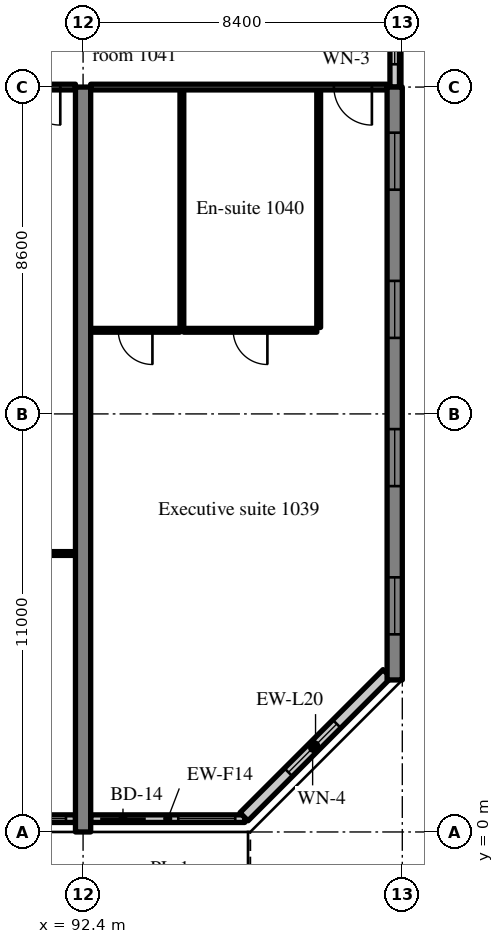
"""IFC4 building model, lengths in metres.
Left out: names, types, materials, properties, quantities, classifications, styles, units other than length and angle.
Written with IfcOpenShell. Run it as: python <this file> out.ifc"""

import sys

from ifc_helpers import new_model, si_unit, direction, frame, frame_2d, origin, place, context, subcontext, project, spatial, rectangle, extrude, source, transform, mapped, element, fill, save


model = new_model("IFC4")
c1 = context("Model", 3, precision=1e-05, world=origin(), true_north=direction((0.0, 1.0)))
c2 = subcontext(c1, "Body", "Model", "MODEL_VIEW")
j1 = project(units=[si_unit("LENGTHUNIT", "METRE"), si_unit("PLANEANGLEUNIT", "RADIAN")], contexts=[c1])
p1 = place(None, origin())
s1 = spatial("IfcSite", under=j1, at=p1, CompositionType="ELEMENT")
p2 = place(p1, origin())
s2 = spatial("IfcBuilding", under=s1, at=p2, CompositionType="ELEMENT")
p3 = place(p2, frame((0.0, 0.0, 46.8)))
s3 = spatial("IfcBuildingStorey", under=s2, at=p3, CompositionType="ELEMENT", Elevation=46.8)
m1 = source(origin(), c2, "Body", "SweptSolid", [
    extrude(rectangle(XDim=19.6, YDim=0.4, at=frame_2d((9.8, 0.0))), origin(), (0.0, 0.0, 1.0), 3.52),
])
p4 = place(p3, frame((92.4, 0.0, 0.0), z_axis=(0.0, 0.0, 1.0), x_axis=(0.0, 1.0, 0.0)))
e1 = element("IfcWall", 1, at=p4, inside=s3, PredefinedType="SHEAR", context=c2, shape_type="MappedRepresentation", body=[
    mapped(m1, transform((0.0, 0.0, 0.0), scale=1.0)),
])
m2 = source(origin(), c2, "Body", "SweptSolid", [
    extrude(rectangle(XDim=15.6, YDim=0.4, at=frame_2d((7.8, 0.0))), origin(), (0.0, 0.0, 1.0), 3.52),
])
p5 = place(p3, frame((100.6, 4.0, 0.0), z_axis=(0.0, 0.0, 1.0), x_axis=(0.0, 1.0, 0.0)))
e2 = element("IfcWall", 2, at=p5, inside=s3, PredefinedType="SHEAR", context=c2, shape_type="MappedRepresentation", body=[
    mapped(m2, transform((0.0, 0.0, 0.0), scale=1.0)),
])
m3 = source(origin(), c2, "Body", "SweptSolid", [
    extrude(rectangle(XDim=1.5, YDim=1.5, at=frame_2d((0.75, 0.75))), frame((0.0, 0.21, 0.0), z_axis=(0.0, -1.0, 0.0), x_axis=(1.0, 0.0, 0.0)), (0.0, 0.0, 1.0), 0.42),
])
p6 = place(p5, frame((1.2, 0.0, 0.9)))
e3 = element("IfcOpeningElement", 3, at=p6, cuts=e2, PredefinedType="OPENING", context=c2, shape_type="MappedRepresentation", body=[
    mapped(m3, transform((0.0, 0.0, 0.0), scale=1.0)),
])
p7 = place(p5, frame((5.1, 0.0, 0.9)))
e4 = element("IfcOpeningElement", 4, at=p7, cuts=e2, PredefinedType="OPENING", context=c2, shape_type="MappedRepresentation", body=[
    mapped(m3, transform((0.0, 0.0, 0.0), scale=1.0)),
])
p8 = place(p5, frame((9.0, 0.0, 0.9)))
e5 = element("IfcOpeningElement", 5, at=p8, cuts=e2, PredefinedType="OPENING", context=c2, shape_type="MappedRepresentation", body=[
    mapped(m3, transform((0.0, 0.0, 0.0), scale=1.0)),
])
p9 = place(p5, frame((12.9, 0.0, 0.9)))
e6 = element("IfcOpeningElement", 6, at=p9, cuts=e2, PredefinedType="OPENING", context=c2, shape_type="MappedRepresentation", body=[
    mapped(m3, transform((0.0, 0.0, 0.0), scale=1.0)),
])
m4 = source(origin(), c2, "Body", "SweptSolid", [
    extrude(rectangle(XDim=3.6, YDim=0.2, at=frame_2d((1.8, 0.0))), origin(), (0.0, 0.0, 1.0), 2.82),
])
p10 = place(p3, frame((88.6, 0.35, 0.0), z_axis=(0.0, 0.0, 1.0), x_axis=(1.0, 0.0, 0.0)))
e7 = element("IfcWall", 7, at=p10, inside=s3, PredefinedType="SOLIDWALL", context=c2, shape_type="MappedRepresentation", body=[
    mapped(m4, transform((0.0, 0.0, 0.0), scale=1.0)),
])
m5 = source(origin(), c2, "Body", "SweptSolid", [
    extrude(rectangle(XDim=1.2, YDim=2.4, at=frame_2d((0.6, 1.2))), frame((0.0, 0.11, 0.0), z_axis=(0.0, -1.0, 0.0), x_axis=(1.0, 0.0, 0.0)), (0.0, 0.0, 1.0), 0.22),
])
p11 = place(p10, frame((0.25, 0.0, 0.0)))
e8 = element("IfcOpeningElement", 8, at=p11, cuts=e7, PredefinedType="OPENING", context=c2, shape_type="MappedRepresentation", body=[
    mapped(m5, transform((0.0, 0.0, 0.0), scale=1.0)),
])
m6 = source(origin(), c2, "Body", "SweptSolid", [
    extrude(rectangle(XDim=1.5, YDim=1.5, at=frame_2d((0.75, 0.75))), frame((0.0, 0.11, 0.0), z_axis=(0.0, -1.0, 0.0), x_axis=(1.0, 0.0, 0.0)), (0.0, 0.0, 1.0), 0.22),
])
p12 = place(p10, frame((1.85, 0.0, 0.9)))
e9 = element("IfcOpeningElement", 9, at=p12, cuts=e7, PredefinedType="OPENING", context=c2, shape_type="MappedRepresentation", body=[
    mapped(m6, transform((0.0, 0.0, 0.0), scale=1.0)),
])
m7 = source(origin(), c2, "Body", "SweptSolid", [
    extrude(rectangle(XDim=4.055, YDim=0.2, at=frame_2d((2.027, 0.0))), origin(), (0.0, 0.0, 1.0), 2.82),
])
p13 = place(p3, frame((92.6, 0.35, 0.0), z_axis=(0.0, 0.0, 1.0), x_axis=(1.0, 0.0, 0.0)))
e10 = element("IfcWall", 10, at=p13, inside=s3, PredefinedType="SOLIDWALL", context=c2, shape_type="MappedRepresentation", body=[
    mapped(m7, transform((0.0, 0.0, 0.0), scale=1.0)),
])
p14 = place(p13, frame((0.25, 0.0, 0.0)))
e11 = element("IfcOpeningElement", 11, at=p14, cuts=e10, PredefinedType="OPENING", context=c2, shape_type="MappedRepresentation", body=[
    mapped(m5, transform((0.0, 0.0, 0.0), scale=1.0)),
])
p15 = place(p13, frame((2.305, 0.0, 0.9)))
e12 = element("IfcOpeningElement", 12, at=p15, cuts=e10, PredefinedType="OPENING", context=c2, shape_type="MappedRepresentation", body=[
    mapped(m6, transform((0.0, 0.0, 0.0), scale=1.0)),
])
m8 = source(origin(), c2, "Body", "SweptSolid", [
    extrude(rectangle(XDim=5.326, YDim=0.3, at=frame_2d((2.663, 0.0))), origin(), (0.0, 0.0, 1.0), 3.52),
])
p16 = place(p3, frame((96.634, 0.4, 0.0), z_axis=(0.0, 0.0, 1.0), x_axis=(0.707083859269, 0.707129702361, 0.0)))
e13 = element("IfcWall", 13, at=p16, inside=s3, PredefinedType="SOLIDWALL", context=c2, shape_type="MappedRepresentation", body=[
    mapped(m8, transform((0.0, 0.0, 0.0), scale=1.0)),
])
m9 = source(origin(), c2, "Body", "SweptSolid", [
    extrude(rectangle(XDim=1.8, YDim=1.5, at=frame_2d((0.9, 0.75))), frame((0.0, 0.16, 0.0), z_axis=(0.0, -1.0, 0.0), x_axis=(1.0, 0.0, 0.0)), (0.0, 0.0, 1.0), 0.32),
])
p17 = place(p16, frame((1.654, 0.0, 0.9)))
e14 = element("IfcOpeningElement", 14, at=p17, cuts=e13, PredefinedType="OPENING", context=c2, shape_type="MappedRepresentation", body=[
    mapped(m9, transform((0.0, 0.0, 0.0), scale=1.0)),
])
m10 = source(origin(), c2, "Body", "SweptSolid", [
    extrude(rectangle(XDim=2.4, YDim=0.25, at=frame_2d((1.2, 0.0))), origin(), (0.0, 0.0, 1.0), 2.62),
])
p18 = place(p3, frame((100.6, 19.6, 0.0), z_axis=(0.0, 0.0, 1.0), x_axis=(0.0, 1.0, 0.0)))
e15 = element("IfcWall", 15, at=p18, inside=s3, PredefinedType="SOLIDWALL", context=c2, shape_type="MappedRepresentation", body=[
    mapped(m10, transform((0.0, 0.0, 0.0), scale=1.0)),
])
m11 = source(origin(), c2, "Body", "SweptSolid", [
    extrude(rectangle(XDim=1.2, YDim=1.5, at=frame_2d((0.6, 0.75))), frame((0.0, 0.135, 0.0), z_axis=(0.0, -1.0, 0.0), x_axis=(1.0, 0.0, 0.0)), (0.0, 0.0, 1.0), 0.27),
])
p19 = place(p18, frame((0.6, 0.0, 0.9)))
e16 = element("IfcOpeningElement", 16, at=p19, cuts=e15, PredefinedType="OPENING", context=c2, shape_type="MappedRepresentation", body=[
    mapped(m11, transform((0.0, 0.0, 0.0), scale=1.0)),
])
m12 = source(origin(), c2, "Body", "SweptSolid", [
    extrude(rectangle(XDim=8.0, YDim=0.1, at=frame_2d((4.0, 0.0))), origin(), (0.0, 0.0, 1.0), 3.52),
])
p20 = place(p3, frame((84.2, 7.327, 0.0), z_axis=(0.0, 0.0, 1.0), x_axis=(1.0, 0.0, 0.0)))
e17 = element("IfcWall", 17, at=p20, inside=s3, PredefinedType="PARTITIONING", context=c2, shape_type="MappedRepresentation", body=[
    mapped(m12, transform((0.0, 0.0, 0.0), scale=1.0)),
])
m13 = source(origin(), c2, "Body", "SweptSolid", [
    extrude(rectangle(XDim=1.8, YDim=2.1, at=frame_2d((0.9, 1.05))), frame((0.0, 0.06, 0.0), z_axis=(0.0, -1.0, 0.0), x_axis=(1.0, 0.0, 0.0)), (0.0, 0.0, 1.0), 0.12),
])
p21 = place(p20, frame((3.1, 0.0, 0.0)))
e18 = element("IfcOpeningElement", 18, at=p21, cuts=e17, PredefinedType="OPENING", context=c2, shape_type="MappedRepresentation", body=[
    mapped(m13, transform((0.0, 0.0, 0.0), scale=1.0)),
])
m14 = source(origin(), c2, "Body", "SweptSolid", [
    extrude(rectangle(XDim=8.0, YDim=0.15, at=frame_2d((4.0, 0.0))), origin(), (0.0, 0.0, 1.0), 2.82),
])
p22 = place(p3, frame((84.2, 19.6, 0.0), z_axis=(0.0, 0.0, 1.0), x_axis=(1.0, 0.0, 0.0)))
e19 = element("IfcWall", 19, at=p22, inside=s3, PredefinedType="PARTITIONING", context=c2, shape_type="MappedRepresentation", body=[
    mapped(m14, transform((0.0, 0.0, 0.0), scale=1.0)),
])
m15 = source(origin(), c2, "Body", "SweptSolid", [
    extrude(rectangle(XDim=1.0, YDim=2.1, at=frame_2d((0.5, 1.05))), frame((0.0, 0.085, 0.0), z_axis=(0.0, -1.0, 0.0), x_axis=(1.0, 0.0, 0.0)), (0.0, 0.0, 1.0), 0.17),
])
p23 = place(p22, frame((6.6, 0.0, 0.0)))
e20 = element("IfcOpeningElement", 20, at=p23, cuts=e19, PredefinedType="OPENING", context=c2, shape_type="MappedRepresentation", body=[
    mapped(m15, transform((0.0, 0.0, 0.0), scale=1.0)),
])
m16 = source(origin(), c2, "Body", "SweptSolid", [
    extrude(rectangle(XDim=6.25, YDim=0.1, at=frame_2d((3.125, 0.0))), origin(), (0.0, 0.0, 1.0), 3.52),
])
for number, where, z_axis, x_axis in (
    (21, (98.6, 13.275, 0.0), (0.0, 0.0, 1.0), (0.0, 1.0, 0.0)),
    (22, (95.0, 13.275, 0.0), (0.0, 0.0, 1.0), (0.0, 1.0, 0.0)),
):
    element("IfcWall", number, at=place(p3, frame(where, z_axis=z_axis, x_axis=x_axis)), inside=s3, PredefinedType="PARTITIONING", context=c2, shape_type="MappedRepresentation", body=[
        mapped(m16, transform((0.0, 0.0, 0.0), scale=1.0)),
    ])
m17 = source(origin(), c2, "Body", "SweptSolid", [
    extrude(rectangle(XDim=3.5, YDim=0.1, at=frame_2d((1.75, 0.0))), origin(), (0.0, 0.0, 1.0), 3.52),
])
p24 = place(p3, frame((95.05, 13.2, 0.0), z_axis=(0.0, 0.0, 1.0), x_axis=(1.0, 0.0, 0.0)))
e23 = element("IfcWall", 23, at=p24, inside=s3, PredefinedType="PARTITIONING", context=c2, shape_type="MappedRepresentation", body=[
    mapped(m17, transform((0.0, 0.0, 0.0), scale=1.0)),
])
m18 = source(origin(), c2, "Body", "SweptSolid", [
    extrude(rectangle(XDim=0.9, YDim=2.1, at=frame_2d((0.45, 1.05))), frame((0.0, 0.06, 0.0), z_axis=(0.0, -1.0, 0.0), x_axis=(1.0, 0.0, 0.0)), (0.0, 0.0, 1.0), 0.12),
])
p25 = place(p24, frame((1.3, 0.0, 0.0)))
e24 = element("IfcOpeningElement", 24, at=p25, cuts=e23, PredefinedType="OPENING", context=c2, shape_type="MappedRepresentation", body=[
    mapped(m18, transform((0.0, 0.0, 0.0), scale=1.0)),
])
m19 = source(origin(), c2, "Body", "SweptSolid", [
    extrude(rectangle(XDim=2.35, YDim=0.1, at=frame_2d((1.175, 0.0))), origin(), (0.0, 0.0, 1.0), 3.52),
])
p26 = place(p3, frame((92.6, 13.2, 0.0), z_axis=(0.0, 0.0, 1.0), x_axis=(1.0, 0.0, 0.0)))
e25 = element("IfcWall", 25, at=p26, inside=s3, PredefinedType="PARTITIONING", context=c2, shape_type="MappedRepresentation", body=[
    mapped(m19, transform((0.0, 0.0, 0.0), scale=1.0)),
])
p27 = place(p26, frame((0.725, 0.0, 0.0)))
e26 = element("IfcOpeningElement", 26, at=p27, cuts=e25, PredefinedType="OPENING", context=c2, shape_type="MappedRepresentation", body=[
    mapped(m18, transform((0.0, 0.0, 0.0), scale=1.0)),
])
m20 = source(origin(), c2, "Body", "SweptSolid", [
    extrude(rectangle(XDim=7.8, YDim=0.15, at=frame_2d((3.9, 0.0))), origin(), (0.0, 0.0, 1.0), 2.82),
])
p28 = place(p3, frame((92.6, 19.6, 0.0), z_axis=(0.0, 0.0, 1.0), x_axis=(1.0, 0.0, 0.0)))
e27 = element("IfcWall", 27, at=p28, inside=s3, PredefinedType="PARTITIONING", context=c2, shape_type="MappedRepresentation", body=[
    mapped(m20, transform((0.0, 0.0, 0.0), scale=1.0)),
])
p29 = place(p28, frame((6.4, 0.0, 0.0)))
e28 = element("IfcOpeningElement", 28, at=p29, cuts=e27, PredefinedType="OPENING", context=c2, shape_type="MappedRepresentation", body=[
    mapped(m15, transform((0.0, 0.0, 0.0), scale=1.0)),
])
m21 = source(origin(), c2, "Body", "SweptSolid", [
    extrude(rectangle(XDim=1.5, YDim=1.5, at=frame_2d((0.75, 0.75))), frame((0.0, 0.03, 0.0), z_axis=(0.0, -1.0, 0.0), x_axis=(1.0, 0.0, 0.0)), (0.0, 0.0, 1.0), 0.06),
])
p30 = place(p12, origin())
e29 = element("IfcWindow", 29, at=p30, inside=s3, PartitioningType="SINGLE_PANEL", PredefinedType="WINDOW", context=c2, shape_type="MappedRepresentation", body=[
    mapped(m21, transform((0.0, 0.0, 0.0), scale=1.0)),
])
fill(e9, e29)
m22 = source(origin(), c2, "Body", "SweptSolid", [
    extrude(rectangle(XDim=1.2, YDim=2.4, at=frame_2d((0.6, 1.2))), frame((0.0, 0.025, 0.0), z_axis=(0.0, -1.0, 0.0), x_axis=(1.0, 0.0, 0.0)), (0.0, 0.0, 1.0), 0.05),
])
p31 = place(p14, origin())
e30 = element("IfcDoor", 30, at=p31, inside=s3, OperationType="SLIDING_TO_RIGHT", PredefinedType="DOOR", context=c2, shape_type="MappedRepresentation", body=[
    mapped(m22, transform((0.0, 0.0, 0.0), scale=1.0)),
])
fill(e11, e30)
p32 = place(p15, origin())
e31 = element("IfcWindow", 31, at=p32, inside=s3, PartitioningType="SINGLE_PANEL", PredefinedType="WINDOW", context=c2, shape_type="MappedRepresentation", body=[
    mapped(m21, transform((0.0, 0.0, 0.0), scale=1.0)),
])
fill(e12, e31)
m23 = source(origin(), c2, "Body", "SweptSolid", [
    extrude(rectangle(XDim=1.8, YDim=1.5, at=frame_2d((0.9, 0.75))), frame((0.0, 0.03, 0.0), z_axis=(0.0, -1.0, 0.0), x_axis=(1.0, 0.0, 0.0)), (0.0, 0.0, 1.0), 0.06),
])
p33 = place(p17, origin())
e32 = element("IfcWindow", 32, at=p33, inside=s3, PartitioningType="SINGLE_PANEL", PredefinedType="WINDOW", context=c2, shape_type="MappedRepresentation", body=[
    mapped(m23, transform((0.0, 0.0, 0.0), scale=1.0)),
])
fill(e14, e32)
p34 = place(p6, origin())
e33 = element("IfcWindow", 33, at=p34, inside=s3, PartitioningType="SINGLE_PANEL", PredefinedType="WINDOW", context=c2, shape_type="MappedRepresentation", body=[
    mapped(m21, transform((0.0, 0.0, 0.0), scale=1.0)),
])
fill(e3, e33)
p35 = place(p7, origin())
e34 = element("IfcWindow", 34, at=p35, inside=s3, PartitioningType="SINGLE_PANEL", PredefinedType="WINDOW", context=c2, shape_type="MappedRepresentation", body=[
    mapped(m21, transform((0.0, 0.0, 0.0), scale=1.0)),
])
fill(e4, e34)
p36 = place(p8, origin())
e35 = element("IfcWindow", 35, at=p36, inside=s3, PartitioningType="SINGLE_PANEL", PredefinedType="WINDOW", context=c2, shape_type="MappedRepresentation", body=[
    mapped(m21, transform((0.0, 0.0, 0.0), scale=1.0)),
])
fill(e5, e35)
p37 = place(p9, origin())
e36 = element("IfcWindow", 36, at=p37, inside=s3, PartitioningType="SINGLE_PANEL", PredefinedType="WINDOW", context=c2, shape_type="MappedRepresentation", body=[
    mapped(m21, transform((0.0, 0.0, 0.0), scale=1.0)),
])
fill(e6, e36)
m24 = source(origin(), c2, "Body", "SweptSolid", [
    extrude(rectangle(XDim=1.2, YDim=1.5, at=frame_2d((0.6, 0.75))), frame((0.0, 0.03, 0.0), z_axis=(0.0, -1.0, 0.0), x_axis=(1.0, 0.0, 0.0)), (0.0, 0.0, 1.0), 0.06),
])
p38 = place(p19, origin())
e37 = element("IfcWindow", 37, at=p38, inside=s3, PartitioningType="SINGLE_PANEL", PredefinedType="WINDOW", context=c2, shape_type="MappedRepresentation", body=[
    mapped(m24, transform((0.0, 0.0, 0.0), scale=1.0)),
])
fill(e16, e37)
m25 = source(origin(), c2, "Body", "SweptSolid", [
    extrude(rectangle(XDim=1.0, YDim=2.1, at=frame_2d((0.5, 1.05))), frame((0.0, 0.025, 0.0), z_axis=(0.0, -1.0, 0.0), x_axis=(1.0, 0.0, 0.0)), (0.0, 0.0, 1.0), 0.05),
])
p39 = place(p23, origin())
e38 = element("IfcDoor", 38, at=p39, inside=s3, OperationType="SINGLE_SWING_RIGHT", PredefinedType="DOOR", context=c2, shape_type="MappedRepresentation", body=[
    mapped(m25, transform((0.0, 0.0, 0.0), scale=1.0)),
])
fill(e20, e38)
m26 = source(origin(), c2, "Body", "SweptSolid", [
    extrude(rectangle(XDim=0.9, YDim=2.1, at=frame_2d((0.45, 1.05))), frame((0.0, 0.025, 0.0), z_axis=(0.0, -1.0, 0.0), x_axis=(1.0, 0.0, 0.0)), (0.0, 0.0, 1.0), 0.05),
])
p40 = place(p25, origin())
e39 = element("IfcDoor", 39, at=p40, inside=s3, OperationType="SINGLE_SWING_RIGHT", PredefinedType="DOOR", context=c2, shape_type="MappedRepresentation", body=[
    mapped(m26, transform((0.0, 0.0, 0.0), scale=1.0)),
])
fill(e24, e39)
p41 = place(p27, origin())
e40 = element("IfcDoor", 40, at=p41, inside=s3, OperationType="SINGLE_SWING_RIGHT", PredefinedType="DOOR", context=c2, shape_type="MappedRepresentation", body=[
    mapped(m26, transform((0.0, 0.0, 0.0), scale=1.0)),
])
fill(e26, e40)
p42 = place(p29, origin())
e41 = element("IfcDoor", 41, at=p42, inside=s3, OperationType="SINGLE_SWING_RIGHT", PredefinedType="DOOR", context=c2, shape_type="MappedRepresentation", body=[
    mapped(m25, transform((0.0, 0.0, 0.0), scale=1.0)),
])
fill(e28, e41)
save(model, sys.argv[1])
